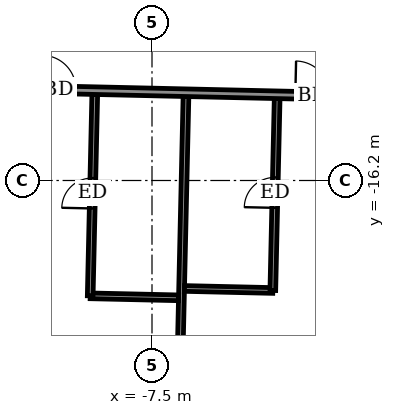
"""IFC4 building model, lengths in metres.
Left out: names, types, materials, properties, quantities, classifications, styles, units other than length and angle.
Written with IfcOpenShell. Run it as: python <this file> out.ifc"""

import sys

from ifc_helpers import new_model, si_unit, direction, frame, frame_2d, origin, place, context, subcontext, project, spatial, rectangle, extrude, element, fill, save


model = new_model("IFC4")
c1 = context("Model", 3, precision=1e-05, world=origin(), true_north=direction((0.0, 1.0)))
c2 = subcontext(c1, "Body", "Model", "MODEL_VIEW")
j1 = project(units=[si_unit("LENGTHUNIT", "METRE"), si_unit("PLANEANGLEUNIT", "RADIAN")], contexts=[c1])
p1 = place(None, origin())
s1 = spatial("IfcSite", under=j1, at=p1, CompositionType="ELEMENT")
p2 = place(p1, origin())
s2 = spatial("IfcBuilding", under=s1, at=p2, CompositionType="ELEMENT")
p3 = place(p2, frame((0.0, 0.0, 313.3)))
s3 = spatial("IfcBuildingStorey", under=s2, at=p3, CompositionType="ELEMENT", Elevation=313.3)
p4 = place(p3, frame((-6.866, -25.438, 0.0), z_axis=(0.0, 0.0, 1.0), x_axis=(0.022706391805, 0.999742176649, 0.0)))
e1 = element("IfcWall", 1, at=p4, inside=s3, PredefinedType="PARTITIONING", context=c2, shape_type="SweptSolid", body=[
    extrude(rectangle(XDim=11.451, YDim=0.15, at=frame_2d((5.726, 0.0))), origin(), (0.0, 0.0, 1.0), 2.5),
])
p5 = place(p3, frame((-9.126, -19.235, 0.0), z_axis=(0.0, 0.0, 1.0), x_axis=(0.999749954681, -0.022361308448, 0.0)))
e2 = element("IfcWall", 2, at=p5, inside=s3, PredefinedType="PARTITIONING", context=c2, shape_type="SweptSolid", body=[
    extrude(rectangle(XDim=2.325, YDim=0.15, at=frame_2d((1.163, 0.0))), origin(), (0.0, 0.0, 1.0), 3.05),
])
p6 = place(p3, frame((-9.126, -19.235, 0.0), z_axis=(0.0, 0.0, 1.0), x_axis=(0.022615729912, 0.999744231672, 0.0)))
e3 = element("IfcWall", 3, at=p6, inside=s3, PredefinedType="PARTITIONING", context=c2, shape_type="SweptSolid", body=[
    extrude(rectangle(XDim=5.301, YDim=0.15, at=frame_2d((2.65, 0.0))), origin(), (0.0, 0.0, 1.0), 3.05),
])
p7 = place(p6, frame((2.3, 0.0, 0.0)))
e4 = element("IfcOpeningElement", 4, at=p7, cuts=e3, PredefinedType="OPENING", context=c2, shape_type="SweptSolid", body=[
    extrude(rectangle(XDim=0.8, YDim=2.1, at=frame_2d((0.4, 1.05))), frame((0.0, 0.085, 0.0), z_axis=(0.0, -1.0, 0.0), x_axis=(1.0, 0.0, 0.0)), (0.0, 0.0, 1.0), 0.17),
])
p8 = place(p3, frame((-6.646, -19.041, 0.0), z_axis=(0.0, 0.0, 1.0), x_axis=(0.999740478815, -0.022781023197, 0.0)))
e5 = element("IfcWall", 5, at=p8, inside=s3, PredefinedType="PARTITIONING", context=c2, shape_type="SweptSolid", body=[
    extrude(rectangle(XDim=2.325, YDim=0.15, at=frame_2d((1.163, 0.0))), origin(), (0.0, 0.0, 1.0), 3.05),
])
p9 = place(p3, frame((-4.321, -19.094, 0.0), z_axis=(0.0, 0.0, 1.0), x_axis=(0.02257535817, 0.999745144126, 0.0)))
e6 = element("IfcWall", 6, at=p9, inside=s3, PredefinedType="PARTITIONING", context=c2, shape_type="SweptSolid", body=[
    extrude(rectangle(XDim=5.05, YDim=0.15, at=frame_2d((2.525, 0.0))), origin(), (0.0, 0.0, 1.0), 3.05),
])
p10 = place(p9, frame((2.175, 0.0, 0.0)))
e7 = element("IfcOpeningElement", 7, at=p10, cuts=e6, PredefinedType="OPENING", context=c2, shape_type="SweptSolid", body=[
    extrude(rectangle(XDim=0.8, YDim=2.1, at=frame_2d((0.4, 1.05))), frame((0.0, 0.085, 0.0), z_axis=(0.0, -1.0, 0.0), x_axis=(1.0, 0.0, 0.0)), (0.0, 0.0, 1.0), 0.17),
])
p11 = place(p3, frame((-31.347, -13.329, 0.0), z_axis=(0.0, 0.0, 1.0), x_axis=(0.999742613079, -0.022687168058, 0.0)))
e8 = element("IfcWall", 8, at=p11, inside=s3, PredefinedType="PARTITIONING", context=c2, shape_type="SweptSolid", body=[
    extrude(rectangle(XDim=58.799, YDim=0.2, at=frame_2d((29.399, 0.0))), origin(), (0.0, 0.0, 1.0), 3.05),
])
p12 = place(p11, frame((1.35, 0.0, 0.0)))
e9 = element("IfcOpeningElement", 9, at=p12, cuts=e8, PredefinedType="OPENING", context=c2, shape_type="SweptSolid", body=[
    extrude(rectangle(XDim=1.0, YDim=2.1, at=frame_2d((0.5, 1.05))), frame((0.0, 0.11, 0.0), z_axis=(0.0, -1.0, 0.0), x_axis=(1.0, 0.0, 0.0)), (0.0, 0.0, 1.0), 0.22),
])
p13 = place(p11, frame((5.95, 0.0, 0.0)))
e10 = element("IfcOpeningElement", 10, at=p13, cuts=e8, PredefinedType="OPENING", context=c2, shape_type="SweptSolid", body=[
    extrude(rectangle(XDim=0.9, YDim=2.1, at=frame_2d((0.45, 1.05))), frame((0.0, 0.11, 0.0), z_axis=(0.0, -1.0, 0.0), x_axis=(1.0, 0.0, 0.0)), (0.0, 0.0, 1.0), 0.22),
])
p14 = place(p11, frame((10.575, 0.0, 0.0)))
e11 = element("IfcOpeningElement", 11, at=p14, cuts=e8, PredefinedType="OPENING", context=c2, shape_type="SweptSolid", body=[
    extrude(rectangle(XDim=0.9, YDim=2.1, at=frame_2d((0.45, 1.05))), frame((0.0, 0.11, 0.0), z_axis=(0.0, -1.0, 0.0), x_axis=(1.0, 0.0, 0.0)), (0.0, 0.0, 1.0), 0.22),
])
p15 = place(p11, frame((12.425, 0.0, 0.0)))
e12 = element("IfcOpeningElement", 12, at=p15, cuts=e8, PredefinedType="OPENING", context=c2, shape_type="SweptSolid", body=[
    extrude(rectangle(XDim=0.9, YDim=2.1, at=frame_2d((0.45, 1.05))), frame((0.0, 0.11, 0.0), z_axis=(0.0, -1.0, 0.0), x_axis=(1.0, 0.0, 0.0)), (0.0, 0.0, 1.0), 0.22),
])
p16 = place(p11, frame((19.075, 0.0, 0.0)))
e13 = element("IfcOpeningElement", 13, at=p16, cuts=e8, PredefinedType="OPENING", context=c2, shape_type="SweptSolid", body=[
    extrude(rectangle(XDim=0.9, YDim=2.1, at=frame_2d((0.45, 1.05))), frame((0.0, 0.11, 0.0), z_axis=(0.0, -1.0, 0.0), x_axis=(1.0, 0.0, 0.0)), (0.0, 0.0, 1.0), 0.22),
])
p17 = place(p11, frame((20.95, 0.0, 0.0)))
e14 = element("IfcOpeningElement", 14, at=p17, cuts=e8, PredefinedType="OPENING", context=c2, shape_type="SweptSolid", body=[
    extrude(rectangle(XDim=0.9, YDim=2.1, at=frame_2d((0.45, 1.05))), frame((0.0, 0.11, 0.0), z_axis=(0.0, -1.0, 0.0), x_axis=(1.0, 0.0, 0.0)), (0.0, 0.0, 1.0), 0.22),
])
p18 = place(p11, frame((27.625, 0.0, 0.0)))
e15 = element("IfcOpeningElement", 15, at=p18, cuts=e8, PredefinedType="OPENING", context=c2, shape_type="SweptSolid", body=[
    extrude(rectangle(XDim=0.9, YDim=2.1, at=frame_2d((0.45, 1.05))), frame((0.0, 0.11, 0.0), z_axis=(0.0, -1.0, 0.0), x_axis=(1.0, 0.0, 0.0)), (0.0, 0.0, 1.0), 0.22),
])
p19 = place(p11, frame((29.475, 0.0, 0.0)))
e16 = element("IfcOpeningElement", 16, at=p19, cuts=e8, PredefinedType="OPENING", context=c2, shape_type="SweptSolid", body=[
    extrude(rectangle(XDim=0.9, YDim=2.1, at=frame_2d((0.45, 1.05))), frame((0.0, 0.11, 0.0), z_axis=(0.0, -1.0, 0.0), x_axis=(1.0, 0.0, 0.0)), (0.0, 0.0, 1.0), 0.22),
])
p20 = place(p11, frame((36.125, 0.0, 0.0)))
e17 = element("IfcOpeningElement", 17, at=p20, cuts=e8, PredefinedType="OPENING", context=c2, shape_type="SweptSolid", body=[
    extrude(rectangle(XDim=0.9, YDim=2.1, at=frame_2d((0.45, 1.05))), frame((0.0, 0.11, 0.0), z_axis=(0.0, -1.0, 0.0), x_axis=(1.0, 0.0, 0.0)), (0.0, 0.0, 1.0), 0.22),
])
p21 = place(p11, frame((37.95, 0.0, 0.0)))
e18 = element("IfcOpeningElement", 18, at=p21, cuts=e8, PredefinedType="OPENING", context=c2, shape_type="SweptSolid", body=[
    extrude(rectangle(XDim=0.9, YDim=2.1, at=frame_2d((0.45, 1.05))), frame((0.0, 0.11, 0.0), z_axis=(0.0, -1.0, 0.0), x_axis=(1.0, 0.0, 0.0)), (0.0, 0.0, 1.0), 0.22),
])
p22 = place(p11, frame((44.6, 0.0, 0.0)))
e19 = element("IfcOpeningElement", 19, at=p22, cuts=e8, PredefinedType="OPENING", context=c2, shape_type="SweptSolid", body=[
    extrude(rectangle(XDim=0.9, YDim=2.1, at=frame_2d((0.45, 1.05))), frame((0.0, 0.11, 0.0), z_axis=(0.0, -1.0, 0.0), x_axis=(1.0, 0.0, 0.0)), (0.0, 0.0, 1.0), 0.22),
])
p23 = place(p11, frame((46.475, 0.0, 0.0)))
e20 = element("IfcOpeningElement", 20, at=p23, cuts=e8, PredefinedType="OPENING", context=c2, shape_type="SweptSolid", body=[
    extrude(rectangle(XDim=0.9, YDim=2.1, at=frame_2d((0.45, 1.05))), frame((0.0, 0.11, 0.0), z_axis=(0.0, -1.0, 0.0), x_axis=(1.0, 0.0, 0.0)), (0.0, 0.0, 1.0), 0.22),
])
p24 = place(p11, frame((55.925, 0.0, 0.0)))
e21 = element("IfcOpeningElement", 21, at=p24, cuts=e8, PredefinedType="OPENING", context=c2, shape_type="SweptSolid", body=[
    extrude(rectangle(XDim=1.0, YDim=2.1, at=frame_2d((0.5, 1.05))), frame((0.0, 0.11, 0.0), z_axis=(0.0, -1.0, 0.0), x_axis=(1.0, 0.0, 0.0)), (0.0, 0.0, 1.0), 0.22),
])
p25 = place(p11, frame((51.0, 0.0, 0.0)))
e22 = element("IfcOpeningElement", 22, at=p25, cuts=e8, PredefinedType="OPENING", context=c2, shape_type="SweptSolid", body=[
    extrude(rectangle(XDim=0.9, YDim=2.1, at=frame_2d((0.45, 1.05))), frame((0.0, 0.11, 0.0), z_axis=(0.0, -1.0, 0.0), x_axis=(1.0, 0.0, 0.0)), (0.0, 0.0, 1.0), 0.22),
])
p26 = place(p17, origin())
e23 = element("IfcDoor", 23, at=p26, inside=s3, OperationType="SINGLE_SWING_RIGHT", PredefinedType="DOOR", context=c2, shape_type="SweptSolid", body=[
    extrude(rectangle(XDim=0.9, YDim=2.1, at=frame_2d((0.45, 1.05))), frame((0.0, 0.025, 0.0), z_axis=(0.0, -1.0, 0.0), x_axis=(1.0, 0.0, 0.0)), (0.0, 0.0, 1.0), 0.05),
])
fill(e14, e23)
p27 = place(p7, origin())
e24 = element("IfcDoor", 24, at=p27, inside=s3, OperationType="SINGLE_SWING_RIGHT", PredefinedType="DOOR", context=c2, shape_type="SweptSolid", body=[
    extrude(rectangle(XDim=0.8, YDim=2.1, at=frame_2d((0.4, 1.05))), frame((0.0, 0.025, 0.0), z_axis=(0.0, -1.0, 0.0), x_axis=(1.0, 0.0, 0.0)), (0.0, 0.0, 1.0), 0.05),
])
fill(e4, e24)
p28 = place(p18, origin())
e25 = element("IfcDoor", 25, at=p28, inside=s3, OperationType="SINGLE_SWING_LEFT", PredefinedType="DOOR", context=c2, shape_type="SweptSolid", body=[
    extrude(rectangle(XDim=0.9, YDim=2.1, at=frame_2d((0.45, 1.05))), frame((0.0, 0.025, 0.0), z_axis=(0.0, -1.0, 0.0), x_axis=(1.0, 0.0, 0.0)), (0.0, 0.0, 1.0), 0.05),
])
fill(e15, e25)
p29 = place(p10, origin())
e26 = element("IfcDoor", 26, at=p29, inside=s3, OperationType="SINGLE_SWING_LEFT", PredefinedType="DOOR", context=c2, shape_type="SweptSolid", body=[
    extrude(rectangle(XDim=0.8, YDim=2.1, at=frame_2d((0.4, 1.05))), frame((0.0, 0.025, 0.0), z_axis=(0.0, -1.0, 0.0), x_axis=(1.0, 0.0, 0.0)), (0.0, 0.0, 1.0), 0.05),
])
fill(e7, e26)
save(model, sys.argv[1])
